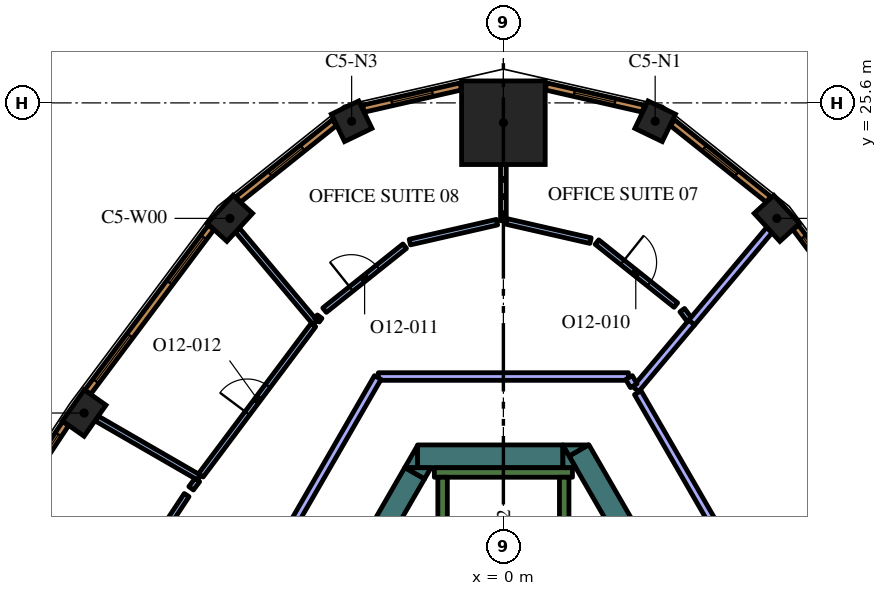
"""IFC4 building model, lengths in metres.
Left out: names, types, materials, properties, quantities, classifications, styles, units other than length and angle.
Written with IfcOpenShell. Run it as: python <this file> out.ifc"""

import sys

from ifc_helpers import new_model, si_unit, direction, frame, frame_2d, origin, origin_2d, place, context, subcontext, project, spatial, polyline, rectangle, outline, extrude, element, fill, save


model = new_model("IFC4")
c1 = context("Model", 3, precision=1e-05, world=origin(), true_north=direction((0.0, 1.0)))
c2 = subcontext(c1, "Body", "Model", "MODEL_VIEW")
j1 = project(units=[si_unit("LENGTHUNIT", "METRE"), si_unit("PLANEANGLEUNIT", "RADIAN")], contexts=[c1])
p1 = place(None, origin())
s1 = spatial("IfcSite", under=j1, at=p1, CompositionType="ELEMENT")
p2 = place(p1, origin())
s2 = spatial("IfcBuilding", under=s1, at=p2, CompositionType="ELEMENT")
p3 = place(p2, frame((0.0, 0.0, 288.0)))
s3 = spatial("IfcBuildingStorey", under=s2, at=p3, CompositionType="ELEMENT", Elevation=288.0)
p4 = place(p3, frame((0.0, 25.078, 0.0), z_axis=(0.0, 0.0, 1.0), x_axis=(0.0, 1.0, 0.0)))
e1 = element("IfcColumn", 1, at=p4, inside=s3, PredefinedType="COLUMN", context=c2, shape_type="SweptSolid", body=[
    extrude(rectangle(XDim=2.2, YDim=2.2, at=origin_2d()), origin(), (0.0, 0.0, 1.0), 4.2),
])
p5 = place(p3, frame((7.195, 22.561, 0.0), z_axis=(0.0, 0.0, 1.0), x_axis=(-0.67580250023, 0.737082750228, 0.0)))
e2 = element("IfcColumn", 2, at=p5, inside=s3, PredefinedType="COLUMN", context=c2, shape_type="SweptSolid", body=[
    extrude(rectangle(XDim=1.0, YDim=0.7, at=origin_2d()), origin(), (0.0, 0.0, 1.0), 4.2),
])
for number, where, z_axis, x_axis in (
    (3, (3.993, 25.116, 0.0), (0.0, 0.0, 1.0), (-0.901, 0.434, 0.0)),
    (4, (-3.993, 25.116, 0.0), (0.0, 0.0, 1.0), (-0.901, -0.434, 0.0)),
):
    element("IfcColumn", number, at=place(p3, frame(where, z_axis=z_axis, x_axis=x_axis)), inside=s3, PredefinedType="COLUMN", context=c2, shape_type="SweptSolid", body=[
        extrude(rectangle(XDim=0.8, YDim=0.8, at=origin_2d()), origin(), (0.0, 0.0, 1.0), 4.2),
    ])
for number, where, z_axis, x_axis in (
    (5, (-7.195, 22.561, 0.0), (0.0, 0.0, 1.0), (-0.676, -0.737, 0.0)),
    (6, (-11.032, 17.44, 0.0), (0.0, 0.0, 1.0), (-0.575, -0.818, 0.0)),
):
    element("IfcColumn", number, at=place(p3, frame(where, z_axis=z_axis, x_axis=x_axis)), inside=s3, PredefinedType="COLUMN", context=c2, shape_type="SweptSolid", body=[
        extrude(rectangle(XDim=1.0, YDim=0.7, at=origin_2d()), origin(), (0.0, 0.0, 1.0), 4.2),
    ])
p6 = place(p3, frame((1.989, 16.456, 0.0), z_axis=(0.0, 0.0, 1.0), x_axis=(0.49999102663, -0.8660305845, 0.0)))
e7 = element("IfcWall", 7, at=p6, inside=s3, PredefinedType="SOLIDWALL", context=c2, shape_type="SweptSolid", body=[
    extrude(rectangle(XDim=12.406, YDim=0.6, at=frame_2d((6.203, 0.0))), origin(), (0.0, 0.0, 1.0), 4.2),
])
p7 = place(p3, origin())
e8 = element("IfcWall", 8, at=p7, inside=s3, PredefinedType="SOLIDWALL", context=c2, shape_type="SweptSolid", body=[
    extrude(outline(polyline([(1.559, 16.6), (2.235, 16.6), (1.728, 16.307), (1.559, 16.6)])), origin(), (0.0, 0.0, 1.0), 4.2),
])
p8 = place(p3, frame((-2.258, 16.3, 0.0), z_axis=(0.0, 0.0, 1.0), x_axis=(1.0, 0.0, 0.0)))
e9 = element("IfcWall", 9, at=p8, inside=s3, PredefinedType="SOLIDWALL", context=c2, shape_type="SweptSolid", body=[
    extrude(rectangle(XDim=3.823, YDim=0.6, at=frame_2d((1.912, 0.0))), origin(), (0.0, 0.0, 1.0), 4.2),
])
e10 = element("IfcWall", 10, at=p7, inside=s3, PredefinedType="SOLIDWALL", context=c2, shape_type="SweptSolid", body=[
    extrude(outline(polyline([(1.905, 16.0), (1.567, 16.0), (1.567, 16.585), (1.905, 16.0)])), origin(), (0.0, 0.0, 1.0), 4.2),
])
e11 = element("IfcWall", 11, at=p7, inside=s3, PredefinedType="SOLIDWALL", context=c2, shape_type="SweptSolid", body=[
    extrude(outline(polyline([(-2.598, 16.0), (-2.26, 16.585), (-2.26, 16.0), (-2.598, 16.0)])), origin(), (0.0, 0.0, 1.0), 4.2),
])
p9 = place(p3, frame((-2.335, 15.855, 0.0), z_axis=(0.0, 0.0, 1.0), x_axis=(-0.499960127962, -0.866048422692, 0.0)))
e12 = element("IfcWall", 12, at=p9, inside=s3, PredefinedType="SOLIDWALL", context=c2, shape_type="SweptSolid", body=[
    extrude(rectangle(XDim=2.934, YDim=0.6, at=frame_2d((1.467, 0.0))), origin(), (0.0, 0.0, 1.0), 4.2),
])
e13 = element("IfcWall", 13, at=p7, inside=s3, PredefinedType="SOLIDWALL", context=c2, shape_type="SweptSolid", body=[
    extrude(outline(polyline([(-1.905, 16.0), (-2.074, 15.707), (-2.581, 16.0), (-1.905, 16.0)])), origin(), (0.0, 0.0, 1.0), 4.2),
])
p10 = place(p3, frame((-1.817, 15.875, 0.0), z_axis=(0.0, 0.0, 1.0), x_axis=(1.0, 0.0, 0.0)))
e14 = element("IfcWall", 14, at=p10, inside=s3, PredefinedType="SOLIDWALL", context=c2, shape_type="SweptSolid", body=[
    extrude(rectangle(XDim=3.634, YDim=0.25, at=frame_2d((1.817, 0.0))), origin(), (0.0, 0.0, 1.0), 4.2),
])
p11 = place(p3, frame((1.6, 8.95, 0.0), z_axis=(0.0, 0.0, 1.0), x_axis=(0.0, 1.0, 0.0)))
e15 = element("IfcWall", 15, at=p11, inside=s3, PredefinedType="SOLIDWALL", context=c2, shape_type="SweptSolid", body=[
    extrude(rectangle(XDim=6.8, YDim=0.25, at=frame_2d((3.4, 0.0))), origin(), (0.0, 0.0, 1.0), 4.2),
])
p12 = place(p3, frame((-1.6, 8.7, 0.0), z_axis=(0.0, 0.0, 1.0), x_axis=(0.0, 1.0, 0.0)))
e16 = element("IfcWall", 16, at=p12, inside=s3, PredefinedType="SOLIDWALL", context=c2, shape_type="SweptSolid", body=[
    extrude(rectangle(XDim=7.05, YDim=0.25, at=frame_2d((3.525, 0.0))), origin(), (0.0, 0.0, 1.0), 4.2),
])
p13 = place(p3, frame((4.95, 19.814, 0.0), z_axis=(0.0, 0.0, 1.0), x_axis=(0.642981953866, 0.765881326971, 0.0)))
e17 = element("IfcWall", 17, at=p13, inside=s3, PredefinedType="PARTITIONING", context=c2, shape_type="SweptSolid", body=[
    extrude(rectangle(XDim=3.188, YDim=0.2, at=frame_2d((1.594, 0.0))), origin(), (0.0, 0.0, 1.0), 3.55),
])
p14 = place(p3, frame((3.483, 18.067, 0.0), z_axis=(0.0, 0.0, 1.0), x_axis=(0.642896944312, 0.765952687177, 0.0)))
e18 = element("IfcWall", 18, at=p14, inside=s3, PredefinedType="PARTITIONING", context=c2, shape_type="SweptSolid", body=[
    extrude(rectangle(XDim=2.29, YDim=0.2, at=frame_2d((1.145, 0.0))), origin(), (0.0, 0.0, 1.0), 3.55),
])
p15 = place(p3, frame((7.421, 11.247, 0.0), z_axis=(0.0, 0.0, 1.0), x_axis=(-0.499999024953, 0.866025966727, 0.0)))
e19 = element("IfcWall", 19, at=p15, inside=s3, PredefinedType="PARTITIONING", context=c2, shape_type="SweptSolid", body=[
    extrude(rectangle(XDim=7.769, YDim=0.2, at=frame_2d((3.884, 0.0))), origin(), (0.0, 0.0, 1.0), 3.55),
])
p16 = place(p3, frame((0.0, 22.5, 0.0), z_axis=(0.0, 0.0, 1.0), x_axis=(0.0, 1.0, 0.0)))
e20 = element("IfcWall", 20, at=p16, inside=s3, PredefinedType="PARTITIONING", context=c2, shape_type="SweptSolid", body=[
    extrude(rectangle(XDim=1.479, YDim=0.15, at=frame_2d((0.739, 0.0))), origin(), (0.0, 0.0, 1.0), 3.55),
])
p17 = place(p3, frame((4.891, 19.899, 0.0), z_axis=(0.0, 0.0, 1.0), x_axis=(-0.6, 0.8, 0.0)))
e21 = element("IfcWall", 21, at=p17, inside=s3, PredefinedType="PARTITIONING", context=c2, shape_type="SweptSolid", body=[
    extrude(rectangle(XDim=0.309, YDim=0.15, at=frame_2d((0.154, 0.0))), origin(), (0.0, 0.0, 1.0), 3.55),
])
p18 = place(p3, frame((2.462, 21.937, 0.0), z_axis=(0.0, 0.0, 1.0), x_axis=(0.781630346222, -0.62374193531, 0.0)))
e22 = element("IfcWall", 22, at=p18, inside=s3, PredefinedType="PARTITIONING", context=c2, shape_type="SweptSolid", body=[
    extrude(rectangle(XDim=2.656, YDim=0.15, at=frame_2d((1.328, 0.0))), origin(), (0.0, 0.0, 1.0), 3.55),
])
p19 = place(p18, frame((0.857, 0.0, 0.0)))
e23 = element("IfcOpeningElement", 23, at=p19, cuts=e22, PredefinedType="OPENING", context=c2, shape_type="SweptSolid", body=[
    extrude(rectangle(XDim=0.9, YDim=2.1, at=frame_2d((0.45, 1.05))), frame((0.0, 0.085, 0.0), z_axis=(0.0, -1.0, 0.0), x_axis=(1.0, 0.0, 0.0)), (0.0, 0.0, 1.0), 0.17),
])
p20 = place(p3, frame((2.293, 21.976, 0.0), z_axis=(0.0, 0.0, 1.0), x_axis=(-0.974905760283, 0.22261796551, 0.0)))
e24 = element("IfcWall", 24, at=p20, inside=s3, PredefinedType="PARTITIONING", context=c2, shape_type="SweptSolid", body=[
    extrude(rectangle(XDim=2.276, YDim=0.15, at=frame_2d((1.138, 0.0))), origin(), (0.0, 0.0, 1.0), 3.55),
])
p21 = place(p3, frame((-4.952, 19.817, 0.0), z_axis=(0.0, 0.0, 1.0), x_axis=(-0.643023053688, 0.765846820471, 0.0)))
e25 = element("IfcWall", 25, at=p21, inside=s3, PredefinedType="PARTITIONING", context=c2, shape_type="SweptSolid", body=[
    extrude(rectangle(XDim=3.184, YDim=0.15, at=frame_2d((1.592, 0.0))), origin(), (0.0, 0.0, 1.0), 3.55),
])
p22 = place(p3, frame((-0.168, 22.461, 0.0), z_axis=(0.0, 0.0, 1.0), x_axis=(-0.974885550769, -0.222706450069, 0.0)))
e26 = element("IfcWall", 26, at=p22, inside=s3, PredefinedType="PARTITIONING", context=c2, shape_type="SweptSolid", body=[
    extrude(rectangle(XDim=2.353, YDim=0.15, at=frame_2d((1.176, 0.0))), origin(), (0.0, 0.0, 1.0), 3.55),
])
p23 = place(p3, frame((-4.706, 20.146, 0.0), z_axis=(0.0, 0.0, 1.0), x_axis=(0.781592149204, 0.623789798172, 0.0)))
e27 = element("IfcWall", 27, at=p23, inside=s3, PredefinedType="PARTITIONING", context=c2, shape_type="SweptSolid", body=[
    extrude(rectangle(XDim=2.698, YDim=0.15, at=frame_2d((1.349, 0.0))), origin(), (0.0, 0.0, 1.0), 3.55),
])
p24 = place(p23, frame((0.898, 0.0, 0.0)))
e28 = element("IfcOpeningElement", 28, at=p24, cuts=e27, PredefinedType="OPENING", context=c2, shape_type="SweptSolid", body=[
    extrude(rectangle(XDim=0.9, YDim=2.1, at=frame_2d((0.45, 1.05))), frame((0.0, 0.085, 0.0), z_axis=(0.0, -1.0, 0.0), x_axis=(1.0, 0.0, 0.0)), (0.0, 0.0, 1.0), 0.17),
])
p25 = place(p3, frame((-4.834, 19.975, 0.0), z_axis=(0.0, 0.0, 1.0), x_axis=(-0.599349659863, -0.800487342325, 0.0)))
e29 = element("IfcWall", 29, at=p25, inside=s3, PredefinedType="PARTITIONING", context=c2, shape_type="SweptSolid", body=[
    extrude(rectangle(XDim=0.12, YDim=0.15, at=frame_2d((0.06, 0.0))), origin(), (0.0, 0.0, 1.0), 3.55),
])
p26 = place(p3, frame((-8.007, 15.74, 0.0), z_axis=(0.0, 0.0, 1.0), x_axis=(-0.866044607523, 0.499966736674, 0.0)))
e30 = element("IfcWall", 30, at=p26, inside=s3, PredefinedType="PARTITIONING", context=c2, shape_type="SweptSolid", body=[
    extrude(rectangle(XDim=3.115, YDim=0.15, at=frame_2d((1.557, 0.0))), origin(), (0.0, 0.0, 1.0), 3.55),
])
p27 = place(p3, frame((-7.962, 15.8, 0.0), z_axis=(0.0, 0.0, 1.0), x_axis=(0.599541489613, 0.800343677574, 0.0)))
e31 = element("IfcWall", 31, at=p27, inside=s3, PredefinedType="PARTITIONING", context=c2, shape_type="SweptSolid", body=[
    extrude(rectangle(XDim=4.942, YDim=0.15, at=frame_2d((2.471, 0.0))), origin(), (0.0, 0.0, 1.0), 3.55),
])
p28 = place(p27, frame((2.042, 0.0, 0.0)))
e32 = element("IfcOpeningElement", 32, at=p28, cuts=e31, PredefinedType="OPENING", context=c2, shape_type="SweptSolid", body=[
    extrude(rectangle(XDim=0.9, YDim=2.1, at=frame_2d((0.45, 1.05))), frame((0.0, 0.085, 0.0), z_axis=(0.0, -1.0, 0.0), x_axis=(1.0, 0.0, 0.0)), (0.0, 0.0, 1.0), 0.17),
])
p29 = place(p3, frame((-8.052, 15.679, 0.0), z_axis=(0.0, 0.0, 1.0), x_axis=(-0.599004157744, -0.800745914136, 0.0)))
e33 = element("IfcWall", 33, at=p29, inside=s3, PredefinedType="PARTITIONING", context=c2, shape_type="SweptSolid", body=[
    extrude(rectangle(XDim=0.275, YDim=0.15, at=frame_2d((0.137, 0.0))), origin(), (0.0, 0.0, 1.0), 3.55),
])
p30 = place(p3, frame((-11.523, 10.449, 0.0), z_axis=(0.0, 0.0, 1.0), x_axis=(0.550751709023, 0.834669129061, 0.0)))
e34 = element("IfcWall", 34, at=p30, inside=s3, PredefinedType="PARTITIONING", context=c2, shape_type="SweptSolid", body=[
    extrude(rectangle(XDim=5.788, YDim=0.15, at=frame_2d((2.894, 0.0))), origin(), (0.0, 0.0, 1.0), 3.55),
])
p31 = place(p30, frame((2.488, 0.0, 0.0)))
e35 = element("IfcOpeningElement", 35, at=p31, cuts=e34, PredefinedType="OPENING", context=c2, shape_type="SweptSolid", body=[
    extrude(rectangle(XDim=0.9, YDim=2.1, at=frame_2d((0.45, 1.05))), frame((0.0, 0.085, 0.0), z_axis=(0.0, -1.0, 0.0), x_axis=(1.0, 0.0, 0.0)), (0.0, 0.0, 1.0), 0.17),
])
p32 = place(p3, frame((3.291, 18.4, 0.0), z_axis=(0.0, 0.0, 1.0), x_axis=(-1.0, 0.0, 0.0)))
e36 = element("IfcWall", 36, at=p32, inside=s3, PredefinedType="PARTITIONING", context=c2, shape_type="SweptSolid", body=[
    extrude(rectangle(XDim=6.582, YDim=0.2, at=frame_2d((3.291, 0.0))), origin(), (0.0, 0.0, 1.0), 3.55),
])
p33 = place(p3, frame((-3.306, 18.374, 0.0), z_axis=(0.0, 0.0, 1.0), x_axis=(-0.499999798456, -0.866025520146, 0.0)))
e37 = element("IfcWall", 37, at=p33, inside=s3, PredefinedType="PARTITIONING", context=c2, shape_type="SweptSolid", body=[
    extrude(rectangle(XDim=8.229, YDim=0.2, at=frame_2d((4.115, 0.0))), origin(), (0.0, 0.0, 1.0), 3.55),
])
p34 = place(p3, frame((3.43, 18.159, 0.0), z_axis=(0.0, 0.0, 1.0), x_axis=(-0.499949632511, 0.866054481515, 0.0)))
e38 = element("IfcWall", 38, at=p34, inside=s3, PredefinedType="PARTITIONING", context=c2, shape_type="SweptSolid", body=[
    extrude(rectangle(XDim=0.248, YDim=0.2, at=frame_2d((0.124, 0.0))), origin(), (0.0, 0.0, 1.0), 3.55),
])
p35 = place(p3, frame((10.938, 17.99, 0.0), z_axis=(0.0, 0.0, 1.0), x_axis=(-0.599559865294, 0.800329911929, 0.0)))
e39 = element("IfcWall", 39, at=p35, inside=s3, PredefinedType="SOLIDWALL", context=c2, shape_type="SweptSolid", body=[
    extrude(rectangle(XDim=5.415, YDim=0.19, at=frame_2d((2.708, 0.0))), origin(), (0.0, 0.0, 1.0), 3.95),
])
p36 = place(p35, frame((0.358, 0.0, 0.6)))
e40 = element("IfcOpeningElement", 40, at=p36, cuts=e39, PredefinedType="OPENING", context=c2, shape_type="SweptSolid", body=[
    extrude(rectangle(XDim=1.5, YDim=2.85, at=frame_2d((0.75, 1.425))), frame((0.0, 0.105, 0.0), z_axis=(0.0, -1.0, 0.0), x_axis=(1.0, 0.0, 0.0)), (0.0, 0.0, 1.0), 0.21),
])
p37 = place(p35, frame((3.593, 0.0, 0.6)))
e41 = element("IfcOpeningElement", 41, at=p37, cuts=e39, PredefinedType="OPENING", context=c2, shape_type="SweptSolid", body=[
    extrude(rectangle(XDim=1.5, YDim=2.85, at=frame_2d((0.75, 1.425))), frame((0.0, 0.105, 0.0), z_axis=(0.0, -1.0, 0.0), x_axis=(1.0, 0.0, 0.0)), (0.0, 0.0, 1.0), 0.21),
])
p38 = place(p3, frame((6.977, 23.061, 0.0), z_axis=(0.0, 0.0, 1.0), x_axis=(-0.781626234064, 0.623747088349, 0.0)))
e42 = element("IfcWall", 42, at=p38, inside=s3, PredefinedType="SOLIDWALL", context=c2, shape_type="SweptSolid", body=[
    extrude(rectangle(XDim=3.237, YDim=0.19, at=frame_2d((1.618, 0.0))), origin(), (0.0, 0.0, 1.0), 3.95),
])
p39 = place(p38, frame((1.068, 0.0, 0.6)))
e43 = element("IfcOpeningElement", 43, at=p39, cuts=e42, PredefinedType="OPENING", context=c2, shape_type="SweptSolid", body=[
    extrude(rectangle(XDim=1.1, YDim=2.85, at=frame_2d((0.55, 1.425))), frame((0.0, 0.105, 0.0), z_axis=(0.0, -1.0, 0.0), x_axis=(1.0, 0.0, 0.0)), (0.0, 0.0, 1.0), 0.21),
])
p40 = place(p3, frame((3.683, 25.449, 0.0), z_axis=(0.0, 0.0, 1.0), x_axis=(-0.974913273386, 0.222585060988, 0.0)))
e44 = element("IfcWall", 44, at=p40, inside=s3, PredefinedType="SOLIDWALL", context=c2, shape_type="SweptSolid", body=[
    extrude(rectangle(XDim=2.627, YDim=0.19, at=frame_2d((1.313, 0.0))), origin(), (0.0, 0.0, 1.0), 3.95),
])
p41 = place(p40, frame((0.763, 0.0, 0.6)))
e45 = element("IfcOpeningElement", 45, at=p41, cuts=e44, PredefinedType="OPENING", context=c2, shape_type="SweptSolid", body=[
    extrude(rectangle(XDim=1.1, YDim=2.85, at=frame_2d((0.55, 1.425))), frame((0.0, 0.105, 0.0), z_axis=(0.0, -1.0, 0.0), x_axis=(1.0, 0.0, 0.0)), (0.0, 0.0, 1.0), 0.21),
])
p42 = place(p3, frame((-1.122, 26.033, 0.0), z_axis=(0.0, 0.0, 1.0), x_axis=(-0.974913273386, -0.222585060988, 0.0)))
e46 = element("IfcWall", 46, at=p42, inside=s3, PredefinedType="SOLIDWALL", context=c2, shape_type="SweptSolid", body=[
    extrude(rectangle(XDim=2.627, YDim=0.19, at=frame_2d((1.313, 0.0))), origin(), (0.0, 0.0, 1.0), 3.95),
])
p43 = place(p42, frame((0.763, 0.0, 0.6)))
e47 = element("IfcOpeningElement", 47, at=p43, cuts=e46, PredefinedType="OPENING", context=c2, shape_type="SweptSolid", body=[
    extrude(rectangle(XDim=1.1, YDim=2.85, at=frame_2d((0.55, 1.425))), frame((0.0, 0.105, 0.0), z_axis=(0.0, -1.0, 0.0), x_axis=(1.0, 0.0, 0.0)), (0.0, 0.0, 1.0), 0.21),
])
p44 = place(p3, frame((-4.448, 25.08, 0.0), z_axis=(0.0, 0.0, 1.0), x_axis=(-0.781626234064, -0.623747088349, 0.0)))
e48 = element("IfcWall", 48, at=p44, inside=s3, PredefinedType="SOLIDWALL", context=c2, shape_type="SweptSolid", body=[
    extrude(rectangle(XDim=3.237, YDim=0.19, at=frame_2d((1.618, 0.0))), origin(), (0.0, 0.0, 1.0), 3.95),
])
p45 = place(p44, frame((1.068, 0.0, 0.6)))
e49 = element("IfcOpeningElement", 49, at=p45, cuts=e48, PredefinedType="OPENING", context=c2, shape_type="SweptSolid", body=[
    extrude(rectangle(XDim=1.1, YDim=2.85, at=frame_2d((0.55, 1.425))), frame((0.0, 0.105, 0.0), z_axis=(0.0, -1.0, 0.0), x_axis=(1.0, 0.0, 0.0)), (0.0, 0.0, 1.0), 0.21),
])
p46 = place(p3, frame((-7.692, 22.324, 0.0), z_axis=(0.0, 0.0, 1.0), x_axis=(-0.599559865294, -0.800329911929, 0.0)))
e50 = element("IfcWall", 50, at=p46, inside=s3, PredefinedType="SOLIDWALL", context=c2, shape_type="SweptSolid", body=[
    extrude(rectangle(XDim=5.415, YDim=0.19, at=frame_2d((2.708, 0.0))), origin(), (0.0, 0.0, 1.0), 3.95),
])
p47 = place(p46, frame((0.323, 0.0, 0.6)))
e51 = element("IfcOpeningElement", 51, at=p47, cuts=e50, PredefinedType="OPENING", context=c2, shape_type="SweptSolid", body=[
    extrude(rectangle(XDim=1.5, YDim=2.85, at=frame_2d((0.75, 1.425))), frame((0.0, 0.105, 0.0), z_axis=(0.0, -1.0, 0.0), x_axis=(1.0, 0.0, 0.0)), (0.0, 0.0, 1.0), 0.21),
])
p48 = place(p46, frame((3.558, 0.0, 0.6)))
e52 = element("IfcOpeningElement", 52, at=p48, cuts=e50, PredefinedType="OPENING", context=c2, shape_type="SweptSolid", body=[
    extrude(rectangle(XDim=1.5, YDim=2.85, at=frame_2d((0.75, 1.425))), frame((0.0, 0.105, 0.0), z_axis=(0.0, -1.0, 0.0), x_axis=(1.0, 0.0, 0.0)), (0.0, 0.0, 1.0), 0.21),
])
p49 = place(p3, frame((-11.518, 17.166, 0.0), z_axis=(0.0, 0.0, 1.0), x_axis=(-0.550744054781, -0.83467417962, 0.0)))
e53 = element("IfcWall", 53, at=p49, inside=s3, PredefinedType="SOLIDWALL", context=c2, shape_type="SweptSolid", body=[
    extrude(rectangle(XDim=5.406, YDim=0.19, at=frame_2d((2.703, 0.0))), origin(), (0.0, 0.0, 1.0), 3.95),
])
p50 = place(p49, frame((0.346, 0.0, 0.6)))
e54 = element("IfcOpeningElement", 54, at=p50, cuts=e53, PredefinedType="OPENING", context=c2, shape_type="SweptSolid", body=[
    extrude(rectangle(XDim=1.5, YDim=2.85, at=frame_2d((0.75, 1.425))), frame((0.0, 0.105, 0.0), z_axis=(0.0, -1.0, 0.0), x_axis=(1.0, 0.0, 0.0)), (0.0, 0.0, 1.0), 0.21),
])
p51 = place(p49, frame((3.559, 0.0, 0.6)))
e55 = element("IfcOpeningElement", 55, at=p51, cuts=e53, PredefinedType="OPENING", context=c2, shape_type="SweptSolid", body=[
    extrude(rectangle(XDim=1.5, YDim=2.85, at=frame_2d((0.75, 1.425))), frame((0.0, 0.105, 0.0), z_axis=(0.0, -1.0, 0.0), x_axis=(1.0, 0.0, 0.0)), (0.0, 0.0, 1.0), 0.21),
])
p52 = place(p19, origin())
e56 = element("IfcDoor", 56, at=p52, inside=s3, OperationType="SINGLE_SWING_LEFT", PredefinedType="DOOR", context=c2, shape_type="SweptSolid", body=[
    extrude(rectangle(XDim=0.9, YDim=2.1, at=frame_2d((0.45, 1.05))), frame((0.0, 0.025, 0.0), z_axis=(0.0, -1.0, 0.0), x_axis=(1.0, 0.0, 0.0)), (0.0, 0.0, 1.0), 0.05),
])
fill(e23, e56)
p53 = place(p24, origin())
e57 = element("IfcDoor", 57, at=p53, inside=s3, OperationType="SINGLE_SWING_LEFT", PredefinedType="DOOR", context=c2, shape_type="SweptSolid", body=[
    extrude(rectangle(XDim=0.9, YDim=2.1, at=frame_2d((0.45, 1.05))), frame((0.0, 0.025, 0.0), z_axis=(0.0, -1.0, 0.0), x_axis=(1.0, 0.0, 0.0)), (0.0, 0.0, 1.0), 0.05),
])
fill(e28, e57)
p54 = place(p28, origin())
e58 = element("IfcDoor", 58, at=p54, inside=s3, OperationType="SINGLE_SWING_RIGHT", PredefinedType="DOOR", context=c2, shape_type="SweptSolid", body=[
    extrude(rectangle(XDim=0.9, YDim=2.1, at=frame_2d((0.45, 1.05))), frame((0.0, 0.025, 0.0), z_axis=(0.0, -1.0, 0.0), x_axis=(1.0, 0.0, 0.0)), (0.0, 0.0, 1.0), 0.05),
])
fill(e32, e58)
p55 = place(p37, origin())
e59 = element("IfcWindow", 59, at=p55, inside=s3, PartitioningType="SINGLE_PANEL", PredefinedType="WINDOW", context=c2, shape_type="SweptSolid", body=[
    extrude(rectangle(XDim=1.5, YDim=2.85, at=frame_2d((0.75, 1.425))), frame((0.0, 0.045, 0.0), z_axis=(0.0, -1.0, 0.0), x_axis=(1.0, 0.0, 0.0)), (0.0, 0.0, 1.0), 0.06),
])
fill(e41, e59)
p56 = place(p39, origin())
e60 = element("IfcWindow", 60, at=p56, inside=s3, PartitioningType="SINGLE_PANEL", PredefinedType="WINDOW", context=c2, shape_type="SweptSolid", body=[
    extrude(rectangle(XDim=1.1, YDim=2.85, at=frame_2d((0.55, 1.425))), frame((0.0, 0.045, 0.0), z_axis=(0.0, -1.0, 0.0), x_axis=(1.0, 0.0, 0.0)), (0.0, 0.0, 1.0), 0.06),
])
fill(e43, e60)
p57 = place(p41, origin())
e61 = element("IfcWindow", 61, at=p57, inside=s3, PartitioningType="SINGLE_PANEL", PredefinedType="WINDOW", context=c2, shape_type="SweptSolid", body=[
    extrude(rectangle(XDim=1.1, YDim=2.85, at=frame_2d((0.55, 1.425))), frame((0.0, 0.045, 0.0), z_axis=(0.0, -1.0, 0.0), x_axis=(1.0, 0.0, 0.0)), (0.0, 0.0, 1.0), 0.06),
])
fill(e45, e61)
p58 = place(p43, origin())
e62 = element("IfcWindow", 62, at=p58, inside=s3, PartitioningType="SINGLE_PANEL", PredefinedType="WINDOW", context=c2, shape_type="SweptSolid", body=[
    extrude(rectangle(XDim=1.1, YDim=2.85, at=frame_2d((0.55, 1.425))), frame((0.0, 0.045, 0.0), z_axis=(0.0, -1.0, 0.0), x_axis=(1.0, 0.0, 0.0)), (0.0, 0.0, 1.0), 0.06),
])
fill(e47, e62)
p59 = place(p45, origin())
e63 = element("IfcWindow", 63, at=p59, inside=s3, PartitioningType="SINGLE_PANEL", PredefinedType="WINDOW", context=c2, shape_type="SweptSolid", body=[
    extrude(rectangle(XDim=1.1, YDim=2.85, at=frame_2d((0.55, 1.425))), frame((0.0, 0.045, 0.0), z_axis=(0.0, -1.0, 0.0), x_axis=(1.0, 0.0, 0.0)), (0.0, 0.0, 1.0), 0.06),
])
fill(e49, e63)
p60 = place(p47, origin())
e64 = element("IfcWindow", 64, at=p60, inside=s3, PartitioningType="SINGLE_PANEL", PredefinedType="WINDOW", context=c2, shape_type="SweptSolid", body=[
    extrude(rectangle(XDim=1.5, YDim=2.85, at=frame_2d((0.75, 1.425))), frame((0.0, 0.045, 0.0), z_axis=(0.0, -1.0, 0.0), x_axis=(1.0, 0.0, 0.0)), (0.0, 0.0, 1.0), 0.06),
])
fill(e51, e64)
p61 = place(p48, origin())
e65 = element("IfcWindow", 65, at=p61, inside=s3, PartitioningType="SINGLE_PANEL", PredefinedType="WINDOW", context=c2, shape_type="SweptSolid", body=[
    extrude(rectangle(XDim=1.5, YDim=2.85, at=frame_2d((0.75, 1.425))), frame((0.0, 0.045, 0.0), z_axis=(0.0, -1.0, 0.0), x_axis=(1.0, 0.0, 0.0)), (0.0, 0.0, 1.0), 0.06),
])
fill(e52, e65)
p62 = place(p50, origin())
e66 = element("IfcWindow", 66, at=p62, inside=s3, PartitioningType="SINGLE_PANEL", PredefinedType="WINDOW", context=c2, shape_type="SweptSolid", body=[
    extrude(rectangle(XDim=1.5, YDim=2.85, at=frame_2d((0.75, 1.425))), frame((0.0, 0.045, 0.0), z_axis=(0.0, -1.0, 0.0), x_axis=(1.0, 0.0, 0.0)), (0.0, 0.0, 1.0), 0.06),
])
fill(e54, e66)
save(model, sys.argv[1])
